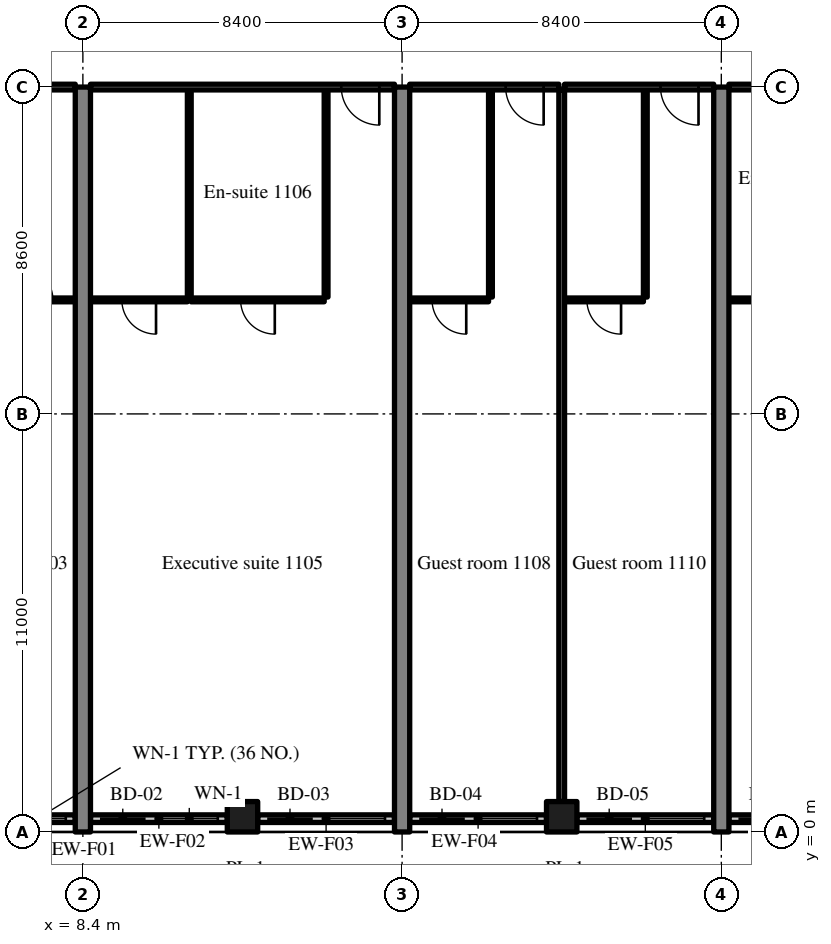
"""IFC4 building model, lengths in metres.
Left out: names, types, materials, properties, quantities, classifications, styles, units other than length and angle.
Written with IfcOpenShell. Run it as: python <this file> out.ifc"""

import sys

from ifc_helpers import new_model, si_unit, direction, frame, frame_2d, origin, origin_2d, place, context, subcontext, project, spatial, rectangle, extrude, source, transform, mapped, element, fill, save


model = new_model("IFC4")
c1 = context("Model", 3, precision=1e-05, world=origin(), true_north=direction((0.0, 1.0)))
c2 = subcontext(c1, "Body", "Model", "MODEL_VIEW")
j1 = project(units=[si_unit("LENGTHUNIT", "METRE"), si_unit("PLANEANGLEUNIT", "RADIAN")], contexts=[c1])
p1 = place(None, origin())
s1 = spatial("IfcSite", under=j1, at=p1, CompositionType="ELEMENT")
p2 = place(p1, origin())
s2 = spatial("IfcBuilding", under=s1, at=p2, CompositionType="ELEMENT")
p3 = place(p2, frame((0.0, 0.0, 50.6)))
s3 = spatial("IfcBuildingStorey", under=s2, at=p3, CompositionType="ELEMENT", Elevation=50.6)
m1 = source(origin(), c2, "Body", "SweptSolid", [
    extrude(rectangle(XDim=19.6, YDim=0.4, at=frame_2d((9.8, 0.0))), origin(), (0.0, 0.0, 1.0), 3.52),
])
for number, where, z_axis, x_axis in (
    (1, (8.4, 0.0, 0.0), (0.0, 0.0, 1.0), (0.0, 1.0, 0.0)),
    (2, (16.8, 0.0, 0.0), (0.0, 0.0, 1.0), (0.0, 1.0, 0.0)),
    (3, (25.2, 0.0, 0.0), (0.0, 0.0, 1.0), (0.0, 1.0, 0.0)),
):
    element("IfcWall", number, at=place(p3, frame(where, z_axis=z_axis, x_axis=x_axis)), inside=s3, PredefinedType="SHEAR", context=c2, shape_type="MappedRepresentation", body=[
        mapped(m1, transform((0.0, 0.0, 0.0), scale=1.0)),
    ])
m2 = source(origin(), c2, "Body", "SweptSolid", [
    extrude(rectangle(XDim=0.8, YDim=0.8, at=origin_2d()), origin(), (0.0, 0.0, 1.0), 3.52),
])
for number, where, z_axis, x_axis in (
    (4, (12.6, 0.4, 0.0), (0.0, 0.0, 1.0), (1.0, 0.0, 0.0)),
    (5, (21.0, 0.4, 0.0), (0.0, 0.0, 1.0), (1.0, 0.0, 0.0)),
):
    element("IfcColumn", number, at=place(p3, frame(where, z_axis=z_axis, x_axis=x_axis)), inside=s3, PredefinedType="COLUMN", context=c2, shape_type="MappedRepresentation", body=[
        mapped(m2, transform((0.0, 0.0, 0.0), scale=1.0)),
    ])
m3 = source(origin(), c2, "Body", "SweptSolid", [
    extrude(rectangle(XDim=4.055, YDim=0.2, at=frame_2d((2.027, 0.0))), origin(), (0.0, 0.0, 1.0), 2.82),
])
p4 = place(p3, frame((4.145, 0.35, 0.0), z_axis=(0.0, 0.0, 1.0), x_axis=(1.0, 0.0, 0.0)))
e6 = element("IfcWall", 6, at=p4, inside=s3, PredefinedType="SOLIDWALL", context=c2, shape_type="MappedRepresentation", body=[
    mapped(m3, transform((0.0, 0.0, 0.0), scale=1.0)),
])
m4 = source(origin(), c2, "Body", "SweptSolid", [
    extrude(rectangle(XDim=1.2, YDim=2.4, at=frame_2d((0.6, 1.2))), frame((0.0, 0.11, 0.0), z_axis=(0.0, -1.0, 0.0), x_axis=(1.0, 0.0, 0.0)), (0.0, 0.0, 1.0), 0.22),
])
p5 = place(p4, frame((0.25, 0.0, 0.0)))
e7 = element("IfcOpeningElement", 7, at=p5, cuts=e6, PredefinedType="OPENING", context=c2, shape_type="MappedRepresentation", body=[
    mapped(m4, transform((0.0, 0.0, 0.0), scale=1.0)),
])
m5 = source(origin(), c2, "Body", "SweptSolid", [
    extrude(rectangle(XDim=1.5, YDim=1.5, at=frame_2d((0.75, 0.75))), frame((0.0, 0.11, 0.0), z_axis=(0.0, -1.0, 0.0), x_axis=(1.0, 0.0, 0.0)), (0.0, 0.0, 1.0), 0.22),
])
p6 = place(p4, frame((2.305, 0.0, 0.9)))
e8 = element("IfcOpeningElement", 8, at=p6, cuts=e6, PredefinedType="OPENING", context=c2, shape_type="MappedRepresentation", body=[
    mapped(m5, transform((0.0, 0.0, 0.0), scale=1.0)),
])
m6 = source(origin(), c2, "Body", "SweptSolid", [
    extrude(rectangle(XDim=3.6, YDim=0.2, at=frame_2d((1.8, 0.0))), origin(), (0.0, 0.0, 1.0), 2.82),
])
p7 = place(p3, frame((8.6, 0.35, 0.0), z_axis=(0.0, 0.0, 1.0), x_axis=(1.0, 0.0, 0.0)))
e9 = element("IfcWall", 9, at=p7, inside=s3, PredefinedType="SOLIDWALL", context=c2, shape_type="MappedRepresentation", body=[
    mapped(m6, transform((0.0, 0.0, 0.0), scale=1.0)),
])
p8 = place(p7, frame((0.25, 0.0, 0.0)))
e10 = element("IfcOpeningElement", 10, at=p8, cuts=e9, PredefinedType="OPENING", context=c2, shape_type="MappedRepresentation", body=[
    mapped(m4, transform((0.0, 0.0, 0.0), scale=1.0)),
])
p9 = place(p7, frame((1.85, 0.0, 0.9)))
e11 = element("IfcOpeningElement", 11, at=p9, cuts=e9, PredefinedType="OPENING", context=c2, shape_type="MappedRepresentation", body=[
    mapped(m5, transform((0.0, 0.0, 0.0), scale=1.0)),
])
m7 = source(origin(), c2, "Body", "SweptSolid", [
    extrude(rectangle(XDim=3.6, YDim=0.2, at=frame_2d((1.8, 0.0))), origin(), (0.0, 0.0, 1.0), 2.82),
])
p10 = place(p3, frame((13.0, 0.35, 0.0), z_axis=(0.0, 0.0, 1.0), x_axis=(1.0, 0.0, 0.0)))
e12 = element("IfcWall", 12, at=p10, inside=s3, PredefinedType="SOLIDWALL", context=c2, shape_type="MappedRepresentation", body=[
    mapped(m7, transform((0.0, 0.0, 0.0), scale=1.0)),
])
p11 = place(p10, frame((0.25, 0.0, 0.0)))
e13 = element("IfcOpeningElement", 13, at=p11, cuts=e12, PredefinedType="OPENING", context=c2, shape_type="MappedRepresentation", body=[
    mapped(m4, transform((0.0, 0.0, 0.0), scale=1.0)),
])
p12 = place(p10, frame((1.85, 0.0, 0.9)))
e14 = element("IfcOpeningElement", 14, at=p12, cuts=e12, PredefinedType="OPENING", context=c2, shape_type="MappedRepresentation", body=[
    mapped(m5, transform((0.0, 0.0, 0.0), scale=1.0)),
])
p13 = place(p3, frame((17.0, 0.35, 0.0), z_axis=(0.0, 0.0, 1.0), x_axis=(1.0, 0.0, 0.0)))
e15 = element("IfcWall", 15, at=p13, inside=s3, PredefinedType="SOLIDWALL", context=c2, shape_type="MappedRepresentation", body=[
    mapped(m7, transform((0.0, 0.0, 0.0), scale=1.0)),
])
p14 = place(p13, frame((0.25, 0.0, 0.0)))
e16 = element("IfcOpeningElement", 16, at=p14, cuts=e15, PredefinedType="OPENING", context=c2, shape_type="MappedRepresentation", body=[
    mapped(m4, transform((0.0, 0.0, 0.0), scale=1.0)),
])
p15 = place(p13, frame((1.85, 0.0, 0.9)))
e17 = element("IfcOpeningElement", 17, at=p15, cuts=e15, PredefinedType="OPENING", context=c2, shape_type="MappedRepresentation", body=[
    mapped(m5, transform((0.0, 0.0, 0.0), scale=1.0)),
])
p16 = place(p3, frame((21.4, 0.35, 0.0), z_axis=(0.0, 0.0, 1.0), x_axis=(1.0, 0.0, 0.0)))
e18 = element("IfcWall", 18, at=p16, inside=s3, PredefinedType="SOLIDWALL", context=c2, shape_type="MappedRepresentation", body=[
    mapped(m7, transform((0.0, 0.0, 0.0), scale=1.0)),
])
p17 = place(p16, frame((0.25, 0.0, 0.0)))
e19 = element("IfcOpeningElement", 19, at=p17, cuts=e18, PredefinedType="OPENING", context=c2, shape_type="MappedRepresentation", body=[
    mapped(m4, transform((0.0, 0.0, 0.0), scale=1.0)),
])
p18 = place(p16, frame((1.85, 0.0, 0.9)))
e20 = element("IfcOpeningElement", 20, at=p18, cuts=e18, PredefinedType="OPENING", context=c2, shape_type="MappedRepresentation", body=[
    mapped(m5, transform((0.0, 0.0, 0.0), scale=1.0)),
])
p19 = place(p3, frame((25.4, 0.35, 0.0), z_axis=(0.0, 0.0, 1.0), x_axis=(1.0, 0.0, 0.0)))
e21 = element("IfcWall", 21, at=p19, inside=s3, PredefinedType="SOLIDWALL", context=c2, shape_type="MappedRepresentation", body=[
    mapped(m7, transform((0.0, 0.0, 0.0), scale=1.0)),
])
p20 = place(p19, frame((0.25, 0.0, 0.0)))
e22 = element("IfcOpeningElement", 22, at=p20, cuts=e21, PredefinedType="OPENING", context=c2, shape_type="MappedRepresentation", body=[
    mapped(m4, transform((0.0, 0.0, 0.0), scale=1.0)),
])
p21 = place(p19, frame((1.85, 0.0, 0.9)))
e23 = element("IfcOpeningElement", 23, at=p21, cuts=e21, PredefinedType="OPENING", context=c2, shape_type="MappedRepresentation", body=[
    mapped(m5, transform((0.0, 0.0, 0.0), scale=1.0)),
])
m8 = source(origin(), c2, "Body", "SweptSolid", [
    extrude(rectangle(XDim=2.075, YDim=0.1, at=frame_2d((1.038, 0.0))), origin(), (0.0, 0.0, 1.0), 3.52),
])
p22 = place(p3, frame((6.125, 14.0, 0.0), z_axis=(0.0, 0.0, 1.0), x_axis=(1.0, 0.0, 0.0)))
e24 = element("IfcWall", 24, at=p22, inside=s3, PredefinedType="PARTITIONING", context=c2, shape_type="MappedRepresentation", body=[
    mapped(m8, transform((0.0, 0.0, 0.0), scale=1.0)),
])
m9 = source(origin(), c2, "Body", "SweptSolid", [
    extrude(rectangle(XDim=0.9, YDim=2.1, at=frame_2d((0.45, 1.05))), frame((0.0, 0.06, 0.0), z_axis=(0.0, -1.0, 0.0), x_axis=(1.0, 0.0, 0.0)), (0.0, 0.0, 1.0), 0.12),
])
p23 = place(p22, frame((0.587, 0.0, 0.0)))
e25 = element("IfcOpeningElement", 25, at=p23, cuts=e24, PredefinedType="OPENING", context=c2, shape_type="MappedRepresentation", body=[
    mapped(m9, transform((0.0, 0.0, 0.0), scale=1.0)),
])
m10 = source(origin(), c2, "Body", "SweptSolid", [
    extrude(rectangle(XDim=3.925, YDim=0.15, at=frame_2d((1.962, 0.0))), origin(), (0.0, 0.0, 1.0), 2.82),
])
p24 = place(p3, frame((4.275, 19.6, 0.0), z_axis=(0.0, 0.0, 1.0), x_axis=(1.0, 0.0, 0.0)))
e26 = element("IfcWall", 26, at=p24, inside=s3, PredefinedType="PARTITIONING", context=c2, shape_type="MappedRepresentation", body=[
    mapped(m10, transform((0.0, 0.0, 0.0), scale=1.0)),
])
m11 = source(origin(), c2, "Body", "SweptSolid", [
    extrude(rectangle(XDim=1.0, YDim=2.1, at=frame_2d((0.5, 1.05))), frame((0.0, 0.085, 0.0), z_axis=(0.0, -1.0, 0.0), x_axis=(1.0, 0.0, 0.0)), (0.0, 0.0, 1.0), 0.17),
])
p25 = place(p24, frame((0.4, 0.0, 0.0)))
e27 = element("IfcOpeningElement", 27, at=p25, cuts=e26, PredefinedType="OPENING", context=c2, shape_type="MappedRepresentation", body=[
    mapped(m11, transform((0.0, 0.0, 0.0), scale=1.0)),
])
m12 = source(origin(), c2, "Body", "SweptSolid", [
    extrude(rectangle(XDim=5.45, YDim=0.1, at=frame_2d((2.725, 0.0))), origin(), (0.0, 0.0, 1.0), 3.52),
])
for number, where, z_axis, x_axis in (
    (28, (14.8, 14.075, 0.0), (0.0, 0.0, 1.0), (0.0, 1.0, 0.0)),
    (29, (11.2, 14.075, 0.0), (0.0, 0.0, 1.0), (0.0, 1.0, 0.0)),
):
    element("IfcWall", number, at=place(p3, frame(where, z_axis=z_axis, x_axis=x_axis)), inside=s3, PredefinedType="PARTITIONING", context=c2, shape_type="MappedRepresentation", body=[
        mapped(m12, transform((0.0, 0.0, 0.0), scale=1.0)),
    ])
m13 = source(origin(), c2, "Body", "SweptSolid", [
    extrude(rectangle(XDim=3.5, YDim=0.1, at=frame_2d((1.75, 0.0))), origin(), (0.0, 0.0, 1.0), 3.52),
])
p26 = place(p3, frame((11.25, 14.0, 0.0), z_axis=(0.0, 0.0, 1.0), x_axis=(1.0, 0.0, 0.0)))
e30 = element("IfcWall", 30, at=p26, inside=s3, PredefinedType="PARTITIONING", context=c2, shape_type="MappedRepresentation", body=[
    mapped(m13, transform((0.0, 0.0, 0.0), scale=1.0)),
])
p27 = place(p26, frame((1.3, 0.0, 0.0)))
e31 = element("IfcOpeningElement", 31, at=p27, cuts=e30, PredefinedType="OPENING", context=c2, shape_type="MappedRepresentation", body=[
    mapped(m9, transform((0.0, 0.0, 0.0), scale=1.0)),
])
m14 = source(origin(), c2, "Body", "SweptSolid", [
    extrude(rectangle(XDim=2.55, YDim=0.1, at=frame_2d((1.275, 0.0))), origin(), (0.0, 0.0, 1.0), 3.52),
])
p28 = place(p3, frame((8.6, 14.0, 0.0), z_axis=(0.0, 0.0, 1.0), x_axis=(1.0, 0.0, 0.0)))
e32 = element("IfcWall", 32, at=p28, inside=s3, PredefinedType="PARTITIONING", context=c2, shape_type="MappedRepresentation", body=[
    mapped(m14, transform((0.0, 0.0, 0.0), scale=1.0)),
])
p29 = place(p28, frame((0.825, 0.0, 0.0)))
e33 = element("IfcOpeningElement", 33, at=p29, cuts=e32, PredefinedType="OPENING", context=c2, shape_type="MappedRepresentation", body=[
    mapped(m9, transform((0.0, 0.0, 0.0), scale=1.0)),
])
m15 = source(origin(), c2, "Body", "SweptSolid", [
    extrude(rectangle(XDim=8.0, YDim=0.15, at=frame_2d((4.0, 0.0))), origin(), (0.0, 0.0, 1.0), 2.82),
])
p30 = place(p3, frame((8.6, 19.6, 0.0), z_axis=(0.0, 0.0, 1.0), x_axis=(1.0, 0.0, 0.0)))
e34 = element("IfcWall", 34, at=p30, inside=s3, PredefinedType="PARTITIONING", context=c2, shape_type="MappedRepresentation", body=[
    mapped(m15, transform((0.0, 0.0, 0.0), scale=1.0)),
])
p31 = place(p30, frame((6.6, 0.0, 0.0)))
e35 = element("IfcOpeningElement", 35, at=p31, cuts=e34, PredefinedType="OPENING", context=c2, shape_type="MappedRepresentation", body=[
    mapped(m11, transform((0.0, 0.0, 0.0), scale=1.0)),
])
p32 = place(p3, frame((19.125, 14.075, 0.0), z_axis=(0.0, 0.0, 1.0), x_axis=(0.0, 1.0, 0.0)))
e36 = element("IfcWall", 36, at=p32, inside=s3, PredefinedType="PARTITIONING", context=c2, shape_type="MappedRepresentation", body=[
    mapped(m12, transform((0.0, 0.0, 0.0), scale=1.0)),
])
p33 = place(p3, frame((17.0, 14.0, 0.0), z_axis=(0.0, 0.0, 1.0), x_axis=(1.0, 0.0, 0.0)))
e37 = element("IfcWall", 37, at=p33, inside=s3, PredefinedType="PARTITIONING", context=c2, shape_type="MappedRepresentation", body=[
    mapped(m8, transform((0.0, 0.0, 0.0), scale=1.0)),
])
p34 = place(p33, frame((0.588, 0.0, 0.0)))
e38 = element("IfcOpeningElement", 38, at=p34, cuts=e37, PredefinedType="OPENING", context=c2, shape_type="MappedRepresentation", body=[
    mapped(m9, transform((0.0, 0.0, 0.0), scale=1.0)),
])
p35 = place(p3, frame((17.0, 19.6, 0.0), z_axis=(0.0, 0.0, 1.0), x_axis=(1.0, 0.0, 0.0)))
e39 = element("IfcWall", 39, at=p35, inside=s3, PredefinedType="PARTITIONING", context=c2, shape_type="MappedRepresentation", body=[
    mapped(m10, transform((0.0, 0.0, 0.0), scale=1.0)),
])
p36 = place(p35, frame((2.525, 0.0, 0.0)))
e40 = element("IfcOpeningElement", 40, at=p36, cuts=e39, PredefinedType="OPENING", context=c2, shape_type="MappedRepresentation", body=[
    mapped(m11, transform((0.0, 0.0, 0.0), scale=1.0)),
])
p37 = place(p3, frame((23.2, 14.075, 0.0), z_axis=(0.0, 0.0, 1.0), x_axis=(0.0, 1.0, 0.0)))
e41 = element("IfcWall", 41, at=p37, inside=s3, PredefinedType="PARTITIONING", context=c2, shape_type="MappedRepresentation", body=[
    mapped(m12, transform((0.0, 0.0, 0.0), scale=1.0)),
])
p38 = place(p3, frame((21.075, 14.0, 0.0), z_axis=(0.0, 0.0, 1.0), x_axis=(1.0, 0.0, 0.0)))
e42 = element("IfcWall", 42, at=p38, inside=s3, PredefinedType="PARTITIONING", context=c2, shape_type="MappedRepresentation", body=[
    mapped(m8, transform((0.0, 0.0, 0.0), scale=1.0)),
])
p39 = place(p38, frame((0.587, 0.0, 0.0)))
e43 = element("IfcOpeningElement", 43, at=p39, cuts=e42, PredefinedType="OPENING", context=c2, shape_type="MappedRepresentation", body=[
    mapped(m9, transform((0.0, 0.0, 0.0), scale=1.0)),
])
p40 = place(p3, frame((21.075, 19.6, 0.0), z_axis=(0.0, 0.0, 1.0), x_axis=(1.0, 0.0, 0.0)))
e44 = element("IfcWall", 44, at=p40, inside=s3, PredefinedType="PARTITIONING", context=c2, shape_type="MappedRepresentation", body=[
    mapped(m10, transform((0.0, 0.0, 0.0), scale=1.0)),
])
p41 = place(p40, frame((2.525, 0.0, 0.0)))
e45 = element("IfcOpeningElement", 45, at=p41, cuts=e44, PredefinedType="OPENING", context=c2, shape_type="MappedRepresentation", body=[
    mapped(m11, transform((0.0, 0.0, 0.0), scale=1.0)),
])
m16 = source(origin(), c2, "Body", "SweptSolid", [
    extrude(rectangle(XDim=18.725, YDim=0.15, at=frame_2d((9.362, 0.0))), origin(), (0.0, 0.0, 1.0), 3.52),
])
p42 = place(p3, frame((21.0, 0.8, 0.0), z_axis=(0.0, 0.0, 1.0), x_axis=(0.0, 1.0, 0.0)))
e46 = element("IfcWall", 46, at=p42, inside=s3, PredefinedType="PARTITIONING", context=c2, shape_type="MappedRepresentation", body=[
    mapped(m16, transform((0.0, 0.0, 0.0), scale=1.0)),
])
m17 = source(origin(), c2, "Body", "SweptSolid", [
    extrude(rectangle(XDim=2.55, YDim=0.1, at=frame_2d((1.275, 0.0))), origin(), (0.0, 0.0, 1.0), 3.52),
])
p43 = place(p3, frame((25.4, 14.0, 0.0), z_axis=(0.0, 0.0, 1.0), x_axis=(1.0, 0.0, 0.0)))
e47 = element("IfcWall", 47, at=p43, inside=s3, PredefinedType="PARTITIONING", context=c2, shape_type="MappedRepresentation", body=[
    mapped(m17, transform((0.0, 0.0, 0.0), scale=1.0)),
])
p44 = place(p43, frame((0.825, 0.0, 0.0)))
e48 = element("IfcOpeningElement", 48, at=p44, cuts=e47, PredefinedType="OPENING", context=c2, shape_type="MappedRepresentation", body=[
    mapped(m9, transform((0.0, 0.0, 0.0), scale=1.0)),
])
p45 = place(p3, frame((25.4, 19.6, 0.0), z_axis=(0.0, 0.0, 1.0), x_axis=(1.0, 0.0, 0.0)))
e49 = element("IfcWall", 49, at=p45, inside=s3, PredefinedType="PARTITIONING", context=c2, shape_type="MappedRepresentation", body=[
    mapped(m15, transform((0.0, 0.0, 0.0), scale=1.0)),
])
p46 = place(p45, frame((6.6, 0.0, 0.0)))
e50 = element("IfcOpeningElement", 50, at=p46, cuts=e49, PredefinedType="OPENING", context=c2, shape_type="MappedRepresentation", body=[
    mapped(m11, transform((0.0, 0.0, 0.0), scale=1.0)),
])
m18 = source(origin(), c2, "Body", "SweptSolid", [
    extrude(rectangle(XDim=1.5, YDim=1.5, at=frame_2d((0.75, 0.75))), frame((0.0, 0.03, 0.0), z_axis=(0.0, -1.0, 0.0), x_axis=(1.0, 0.0, 0.0)), (0.0, 0.0, 1.0), 0.06),
])
p47 = place(p6, origin())
e51 = element("IfcWindow", 51, at=p47, inside=s3, PartitioningType="SINGLE_PANEL", PredefinedType="WINDOW", context=c2, shape_type="MappedRepresentation", body=[
    mapped(m18, transform((0.0, 0.0, 0.0), scale=1.0)),
])
fill(e8, e51)
m19 = source(origin(), c2, "Body", "SweptSolid", [
    extrude(rectangle(XDim=1.2, YDim=2.4, at=frame_2d((0.6, 1.2))), frame((0.0, 0.025, 0.0), z_axis=(0.0, -1.0, 0.0), x_axis=(1.0, 0.0, 0.0)), (0.0, 0.0, 1.0), 0.05),
])
p48 = place(p8, origin())
e52 = element("IfcDoor", 52, at=p48, inside=s3, OperationType="SLIDING_TO_RIGHT", PredefinedType="DOOR", context=c2, shape_type="MappedRepresentation", body=[
    mapped(m19, transform((0.0, 0.0, 0.0), scale=1.0)),
])
fill(e10, e52)
p49 = place(p9, origin())
e53 = element("IfcWindow", 53, at=p49, inside=s3, PartitioningType="SINGLE_PANEL", PredefinedType="WINDOW", context=c2, shape_type="MappedRepresentation", body=[
    mapped(m18, transform((0.0, 0.0, 0.0), scale=1.0)),
])
fill(e11, e53)
p50 = place(p11, origin())
e54 = element("IfcDoor", 54, at=p50, inside=s3, OperationType="SLIDING_TO_LEFT", PredefinedType="DOOR", context=c2, shape_type="MappedRepresentation", body=[
    mapped(m19, transform((0.0, 0.0, 0.0), scale=1.0)),
])
fill(e13, e54)
p51 = place(p12, origin())
e55 = element("IfcWindow", 55, at=p51, inside=s3, PartitioningType="SINGLE_PANEL", PredefinedType="WINDOW", context=c2, shape_type="MappedRepresentation", body=[
    mapped(m18, transform((0.0, 0.0, 0.0), scale=1.0)),
])
fill(e14, e55)
p52 = place(p14, origin())
e56 = element("IfcDoor", 56, at=p52, inside=s3, OperationType="SLIDING_TO_RIGHT", PredefinedType="DOOR", context=c2, shape_type="MappedRepresentation", body=[
    mapped(m19, transform((0.0, 0.0, 0.0), scale=1.0)),
])
fill(e16, e56)
p53 = place(p15, origin())
e57 = element("IfcWindow", 57, at=p53, inside=s3, PartitioningType="SINGLE_PANEL", PredefinedType="WINDOW", context=c2, shape_type="MappedRepresentation", body=[
    mapped(m18, transform((0.0, 0.0, 0.0), scale=1.0)),
])
fill(e17, e57)
p54 = place(p17, origin())
e58 = element("IfcDoor", 58, at=p54, inside=s3, OperationType="SLIDING_TO_LEFT", PredefinedType="DOOR", context=c2, shape_type="MappedRepresentation", body=[
    mapped(m19, transform((0.0, 0.0, 0.0), scale=1.0)),
])
fill(e19, e58)
p55 = place(p18, origin())
e59 = element("IfcWindow", 59, at=p55, inside=s3, PartitioningType="SINGLE_PANEL", PredefinedType="WINDOW", context=c2, shape_type="MappedRepresentation", body=[
    mapped(m18, transform((0.0, 0.0, 0.0), scale=1.0)),
])
fill(e20, e59)
p56 = place(p20, origin())
e60 = element("IfcDoor", 60, at=p56, inside=s3, OperationType="SLIDING_TO_RIGHT", PredefinedType="DOOR", context=c2, shape_type="MappedRepresentation", body=[
    mapped(m19, transform((0.0, 0.0, 0.0), scale=1.0)),
])
fill(e22, e60)
m20 = source(origin(), c2, "Body", "SweptSolid", [
    extrude(rectangle(XDim=0.9, YDim=2.1, at=frame_2d((0.45, 1.05))), frame((0.0, 0.025, 0.0), z_axis=(0.0, -1.0, 0.0), x_axis=(1.0, 0.0, 0.0)), (0.0, 0.0, 1.0), 0.05),
])
p57 = place(p23, origin())
e61 = element("IfcDoor", 61, at=p57, inside=s3, OperationType="SINGLE_SWING_LEFT", PredefinedType="DOOR", context=c2, shape_type="MappedRepresentation", body=[
    mapped(m20, transform((0.0, 0.0, 0.0), scale=1.0)),
])
fill(e25, e61)
p58 = place(p27, origin())
e62 = element("IfcDoor", 62, at=p58, inside=s3, OperationType="SINGLE_SWING_RIGHT", PredefinedType="DOOR", context=c2, shape_type="MappedRepresentation", body=[
    mapped(m20, transform((0.0, 0.0, 0.0), scale=1.0)),
])
fill(e31, e62)
p59 = place(p29, origin())
e63 = element("IfcDoor", 63, at=p59, inside=s3, OperationType="SINGLE_SWING_RIGHT", PredefinedType="DOOR", context=c2, shape_type="MappedRepresentation", body=[
    mapped(m20, transform((0.0, 0.0, 0.0), scale=1.0)),
])
fill(e33, e63)
m21 = source(origin(), c2, "Body", "SweptSolid", [
    extrude(rectangle(XDim=1.0, YDim=2.1, at=frame_2d((0.5, 1.05))), frame((0.0, 0.025, 0.0), z_axis=(0.0, -1.0, 0.0), x_axis=(1.0, 0.0, 0.0)), (0.0, 0.0, 1.0), 0.05),
])
p60 = place(p31, origin())
e64 = element("IfcDoor", 64, at=p60, inside=s3, OperationType="SINGLE_SWING_RIGHT", PredefinedType="DOOR", context=c2, shape_type="MappedRepresentation", body=[
    mapped(m21, transform((0.0, 0.0, 0.0), scale=1.0)),
])
fill(e35, e64)
p61 = place(p34, origin())
e65 = element("IfcDoor", 65, at=p61, inside=s3, OperationType="SINGLE_SWING_RIGHT", PredefinedType="DOOR", context=c2, shape_type="MappedRepresentation", body=[
    mapped(m20, transform((0.0, 0.0, 0.0), scale=1.0)),
])
fill(e38, e65)
p62 = place(p36, origin())
e66 = element("IfcDoor", 66, at=p62, inside=s3, OperationType="SINGLE_SWING_RIGHT", PredefinedType="DOOR", context=c2, shape_type="MappedRepresentation", body=[
    mapped(m21, transform((0.0, 0.0, 0.0), scale=1.0)),
])
fill(e40, e66)
p63 = place(p39, origin())
e67 = element("IfcDoor", 67, at=p63, inside=s3, OperationType="SINGLE_SWING_RIGHT", PredefinedType="DOOR", context=c2, shape_type="MappedRepresentation", body=[
    mapped(m20, transform((0.0, 0.0, 0.0), scale=1.0)),
])
fill(e43, e67)
p64 = place(p41, origin())
e68 = element("IfcDoor", 68, at=p64, inside=s3, OperationType="SINGLE_SWING_RIGHT", PredefinedType="DOOR", context=c2, shape_type="MappedRepresentation", body=[
    mapped(m21, transform((0.0, 0.0, 0.0), scale=1.0)),
])
fill(e45, e68)
save(model, sys.argv[1])
